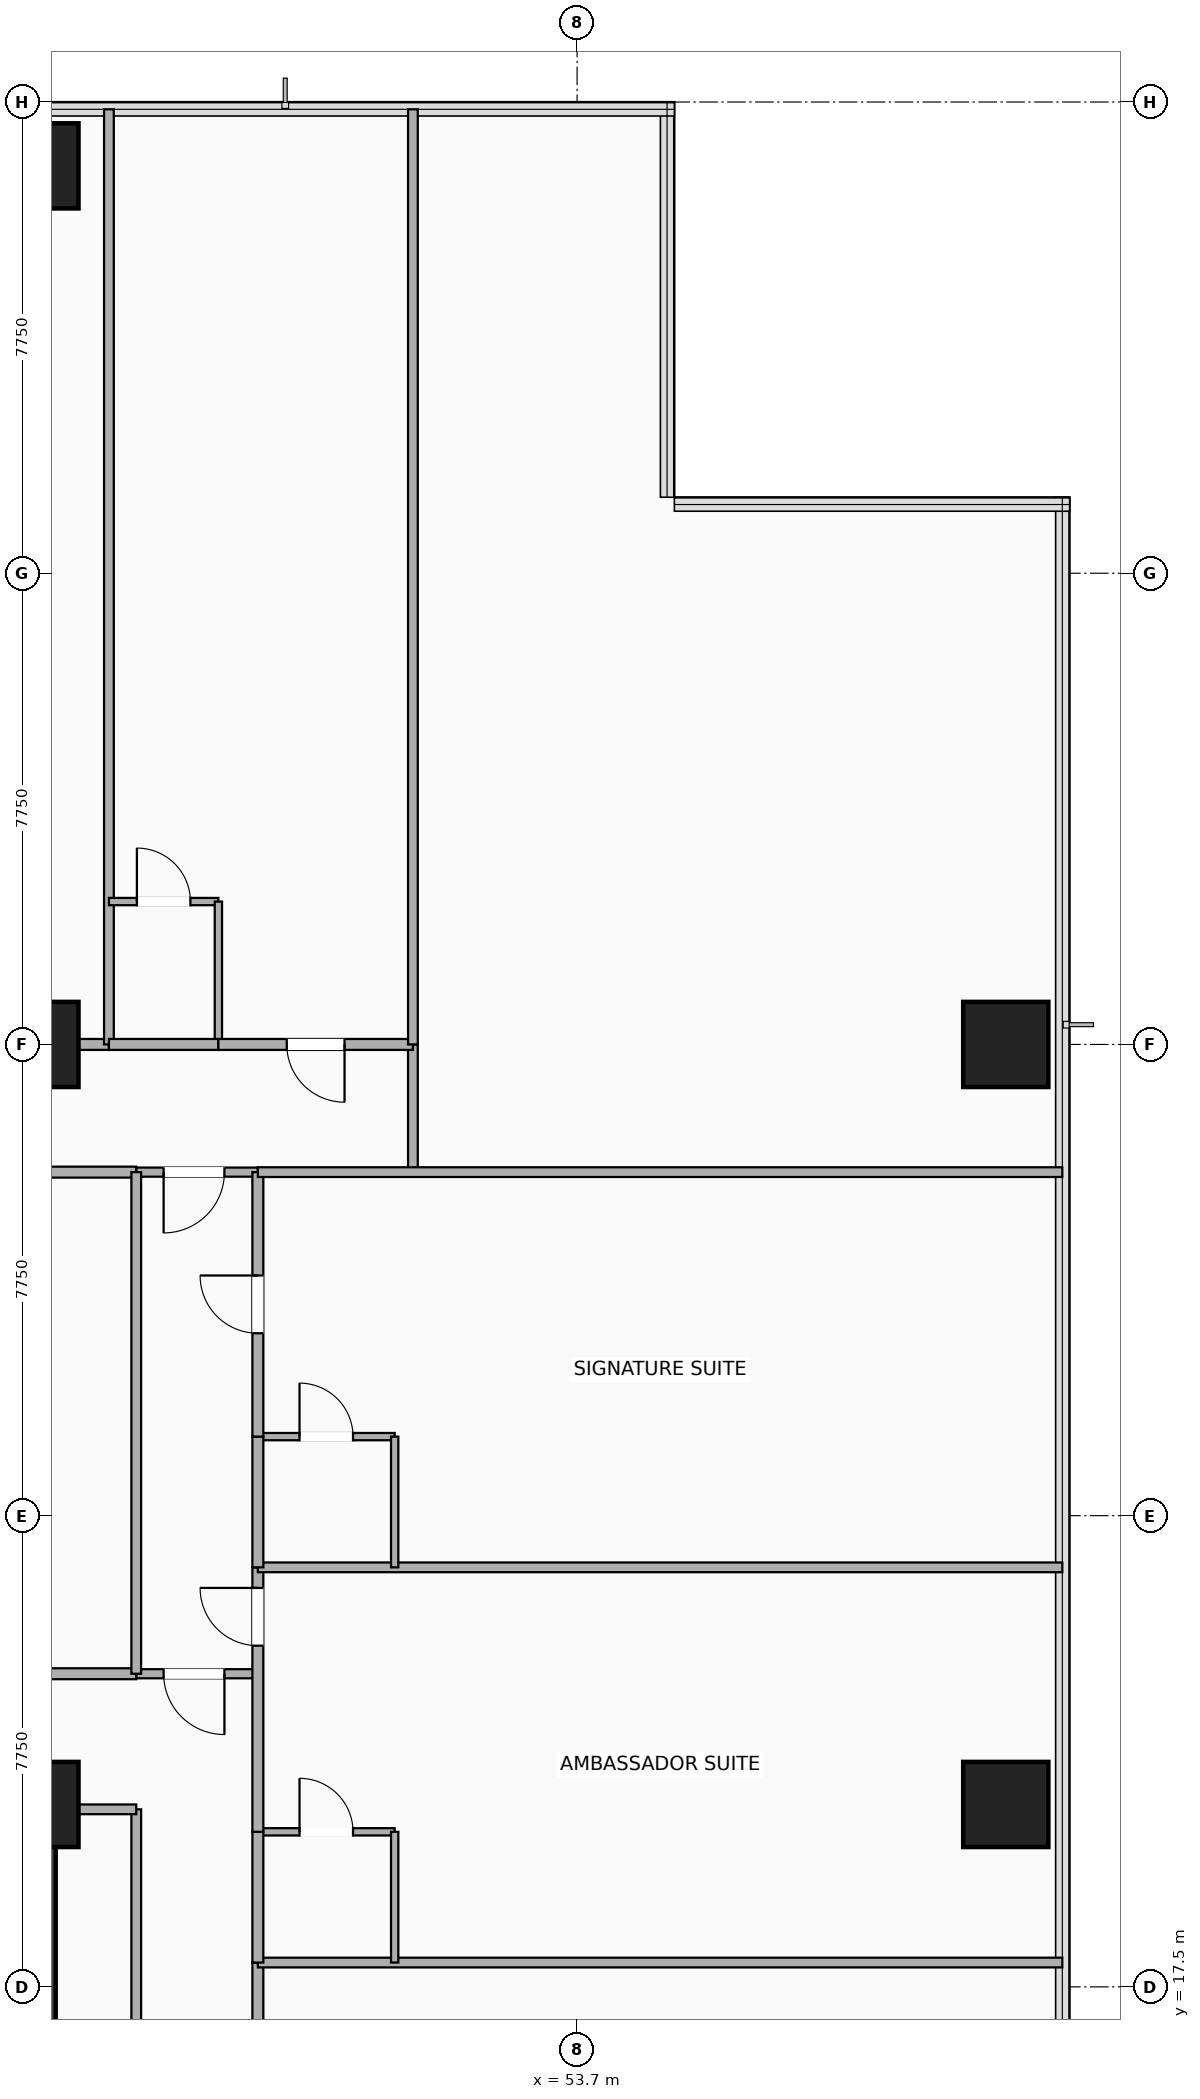
"""IFC4 building model, lengths in metres.
Left out: names, types, materials, properties, quantities, classifications, styles, units other than length and angle.
Written with IfcOpenShell. Run it as: python <this file> out.ifc"""

import sys

from ifc_helpers import new_model, si_unit, direction, frame, frame_2d, origin, origin_2d, place, context, subcontext, project, spatial, rectangle, extrude, element, fill, save


model = new_model("IFC4")
c1 = context("Model", 3, precision=1e-05, world=origin(), true_north=direction((0.0, 1.0)))
c2 = subcontext(c1, "Body", "Model", "MODEL_VIEW")
j1 = project(units=[si_unit("LENGTHUNIT", "METRE"), si_unit("PLANEANGLEUNIT", "RADIAN")], contexts=[c1])
p1 = place(None, origin())
s1 = spatial("IfcSite", under=j1, at=p1, CompositionType="ELEMENT")
p2 = place(p1, origin())
s2 = spatial("IfcBuilding", under=s1, at=p2, CompositionType="ELEMENT")
p3 = place(p2, frame((0.0, 0.0, 50.9)))
s3 = spatial("IfcBuildingStorey", under=s2, at=p3, CompositionType="ELEMENT", Elevation=50.9)
p4 = place(p3, frame((44.8, 3.5, 0.0), z_axis=(0.0, 0.0, 1.0), x_axis=(0.0, 1.0, 0.0)))
e1 = element("IfcWall", 1, at=p4, inside=s3, PredefinedType="SHEAR", context=c2, shape_type="SweptSolid", body=[
    extrude(rectangle(XDim=16.9, YDim=0.65, at=frame_2d((8.45, 0.0))), origin(), (0.0, 0.0, 1.0), 3.22),
])
for number, where, z_axis, x_axis in (
    (2, (44.8, 20.5, -0.28), (0.0, 0.0, 1.0), (1.0, 0.0, 0.0)),
    (3, (44.8, 33.0, -0.28), (0.0, 0.0, 1.0), (1.0, 0.0, 0.0)),
    (4, (60.75, 20.5, -0.28), (0.0, 0.0, 1.0), (1.0, 0.0, 0.0)),
    (5, (60.75, 33.0, -0.28), (0.0, 0.0, 1.0), (1.0, 0.0, 0.0)),
    (6, (44.8, 47.45, -0.28), (0.0, 0.0, 1.0), (1.0, 0.0, 0.0)),
):
    element("IfcColumn", number, at=place(p3, frame(where, z_axis=z_axis, x_axis=x_axis)), inside=s3, PredefinedType="COLUMN", context=c2, shape_type="SweptSolid", body=[
        extrude(rectangle(XDim=1.4, YDim=1.4, at=origin_2d()), origin(), (0.0, 0.0, 1.0), 3.5),
    ])
p5 = place(p3, frame((46.45, 11.4, 0.0), z_axis=(0.0, 0.0, 1.0), x_axis=(0.0, 1.0, 0.0)))
e7 = element("IfcWall", 7, at=p5, inside=s3, PredefinedType="PARTITIONING", context=c2, shape_type="SweptSolid", body=[
    extrude(rectangle(XDim=9.02, YDim=0.16, at=frame_2d((4.51, 0.0))), origin(), (0.0, 0.0, 1.0), 2.51),
])
p6 = place(p5, frame((0.4, 0.0, 0.0)))
e8 = element("IfcOpeningElement", 8, at=p6, cuts=e7, PredefinedType="OPENING", context=c2, shape_type="SweptSolid", body=[
    extrude(rectangle(XDim=0.88, YDim=2.08, at=frame_2d((0.44, 1.04))), frame((0.0, 0.09, 0.0), z_axis=(0.0, -1.0, 0.0), x_axis=(1.0, 0.0, 0.0)), (0.0, 0.0, 1.0), 0.18),
])
p7 = place(p3, frame((44.8, 20.42, 0.0), z_axis=(0.0, 0.0, 1.0), x_axis=(1.0, 0.0, 0.0)))
e9 = element("IfcWall", 9, at=p7, inside=s3, PredefinedType="PARTITIONING", context=c2, shape_type="SweptSolid", body=[
    extrude(rectangle(XDim=1.65, YDim=0.16, at=frame_2d((0.825, 0.0))), origin(), (0.0, 0.0, 1.0), 2.51),
])
p8 = place(p3, frame((46.45, 22.65, 0.0), z_axis=(0.0, 0.0, 1.0), x_axis=(1.0, 0.0, 0.0)))
e10 = element("IfcWall", 10, at=p8, inside=s3, PredefinedType="PARTITIONING", context=c2, shape_type="SweptSolid", body=[
    extrude(rectangle(XDim=2.0, YDim=0.15, at=frame_2d((1.0, 0.0))), origin(), (0.0, 0.0, 1.0), 3.22),
])
p9 = place(p8, frame((0.45, 0.0, 0.0)))
e11 = element("IfcOpeningElement", 11, at=p9, cuts=e10, PredefinedType="OPENING", context=c2, shape_type="SweptSolid", body=[
    extrude(rectangle(XDim=1.0, YDim=2.15, at=frame_2d((0.5, 1.075))), frame((0.0, 0.085, 0.0), z_axis=(0.0, -1.0, 0.0), x_axis=(1.0, 0.0, 0.0)), (0.0, 0.0, 1.0), 0.17),
])
p10 = place(p3, frame((46.45, 30.9, 0.0), z_axis=(0.0, 0.0, 1.0), x_axis=(1.0, 0.0, 0.0)))
e12 = element("IfcWall", 12, at=p10, inside=s3, PredefinedType="PARTITIONING", context=c2, shape_type="SweptSolid", body=[
    extrude(rectangle(XDim=2.0, YDim=0.15, at=frame_2d((1.0, 0.0))), origin(), (0.0, 0.0, 1.0), 3.22),
])
p11 = place(p10, frame((0.45, 0.0, 0.0)))
e13 = element("IfcOpeningElement", 13, at=p11, cuts=e12, PredefinedType="OPENING", context=c2, shape_type="SweptSolid", body=[
    extrude(rectangle(XDim=1.0, YDim=2.15, at=frame_2d((0.5, 1.075))), frame((0.0, 0.085, 0.0), z_axis=(0.0, -1.0, 0.0), x_axis=(1.0, 0.0, 0.0)), (0.0, 0.0, 1.0), 0.17),
])
p12 = place(p3, frame((51.0, 30.9, 0.0), z_axis=(0.0, 0.0, 1.0), x_axis=(0.0, 1.0, 0.0)))
e14 = element("IfcWall", 14, at=p12, inside=s3, PredefinedType="PARTITIONING", context=c2, shape_type="SweptSolid", body=[
    extrude(rectangle(XDim=2.1, YDim=0.16, at=frame_2d((1.05, 0.0))), origin(), (0.0, 0.0, 1.0), 2.51),
])
p13 = place(p3, frame((40.9, 22.65, 0.0), z_axis=(0.0, 0.0, 1.0), x_axis=(1.0, 0.0, 0.0)))
e15 = element("IfcWall", 15, at=p13, inside=s3, PredefinedType="PARTITIONING", context=c2, shape_type="SweptSolid", body=[
    extrude(rectangle(XDim=5.55, YDim=0.18, at=frame_2d((2.775, 0.0))), origin(), (0.0, 0.0, 1.0), 2.51),
])
p14 = place(p13, frame((2.3, 0.0, 0.0)))
e16 = element("IfcOpeningElement", 16, at=p14, cuts=e15, PredefinedType="OPENING", context=c2, shape_type="SweptSolid", body=[
    extrude(rectangle(XDim=0.95, YDim=2.15, at=frame_2d((0.475, 1.075))), frame((0.0, 0.1, 0.0), z_axis=(0.0, -1.0, 0.0), x_axis=(1.0, 0.0, 0.0)), (0.0, 0.0, 1.0), 0.2),
])
p15 = place(p3, frame((40.9, 30.9, 0.0), z_axis=(0.0, 0.0, 1.0), x_axis=(1.0, 0.0, 0.0)))
e17 = element("IfcWall", 17, at=p15, inside=s3, PredefinedType="PARTITIONING", context=c2, shape_type="SweptSolid", body=[
    extrude(rectangle(XDim=5.55, YDim=0.18, at=frame_2d((2.775, 0.0))), origin(), (0.0, 0.0, 1.0), 2.51),
])
p16 = place(p3, frame((46.45, 22.65, 0.0), z_axis=(0.0, 0.0, 1.0), x_axis=(0.0, 1.0, 0.0)))
e18 = element("IfcWall", 18, at=p16, inside=s3, PredefinedType="PARTITIONING", context=c2, shape_type="SweptSolid", body=[
    extrude(rectangle(XDim=8.25, YDim=0.16, at=frame_2d((4.125, 0.0))), origin(), (0.0, 0.0, 1.0), 2.788),
])
p17 = place(p3, frame((38.273, 33.0, 0.0), z_axis=(0.0, 0.0, 1.0), x_axis=(1.0, 0.0, 0.0)))
e19 = element("IfcWall", 19, at=p17, inside=s3, PredefinedType="PARTITIONING", context=c2, shape_type="SweptSolid", body=[
    extrude(rectangle(XDim=7.728, YDim=0.18, at=frame_2d((3.864, 0.0))), origin(), (0.0, 0.0, 1.0), 2.51),
])
p18 = place(p17, frame((3.389, 0.0, 0.0)))
e20 = element("IfcOpeningElement", 20, at=p18, cuts=e19, PredefinedType="OPENING", context=c2, shape_type="SweptSolid", body=[
    extrude(rectangle(XDim=0.95, YDim=2.15, at=frame_2d((0.475, 1.075))), frame((0.0, 0.1, 0.0), z_axis=(0.0, -1.0, 0.0), x_axis=(1.0, 0.0, 0.0)), (0.0, 0.0, 1.0), 0.2),
])
p19 = place(p3, frame((46.001, 33.0, 0.0), z_axis=(0.0, 0.0, 1.0), x_axis=(0.0, 1.0, 0.0)))
e21 = element("IfcWall", 21, at=p19, inside=s3, PredefinedType="PARTITIONING", context=c2, shape_type="SweptSolid", body=[
    extrude(rectangle(XDim=15.38, YDim=0.16, at=frame_2d((7.69, 0.0))), origin(), (0.0, 0.0, 1.0), 2.51),
])
p20 = place(p3, frame((46.001, 35.35, 0.0), z_axis=(0.0, 0.0, 1.0), x_axis=(1.0, 0.0, 0.0)))
e22 = element("IfcWall", 22, at=p20, inside=s3, PredefinedType="PARTITIONING", context=c2, shape_type="SweptSolid", body=[
    extrude(rectangle(XDim=1.8, YDim=0.12, at=frame_2d((0.9, 0.0))), origin(), (0.0, 0.0, 1.0), 3.22),
])
p21 = place(p20, frame((1.34, 0.0, 0.0), z_axis=(0.0, 0.0, 1.0), x_axis=(-1.0, 0.0, 0.0)))
e23 = element("IfcOpeningElement", 23, at=p21, cuts=e22, PredefinedType="OPENING", context=c2, shape_type="SweptSolid", body=[
    extrude(rectangle(XDim=0.88, YDim=2.08, at=frame_2d((0.44, 1.04))), frame((0.0, 0.07, 0.0), z_axis=(0.0, -1.0, 0.0), x_axis=(1.0, 0.0, 0.0)), (0.0, 0.0, 1.0), 0.14),
])
p22 = place(p3, frame((47.801, 33.0, 0.0), z_axis=(0.0, 0.0, 1.0), x_axis=(0.0, 1.0, 0.0)))
e24 = element("IfcWall", 24, at=p22, inside=s3, PredefinedType="PARTITIONING", context=c2, shape_type="SweptSolid", body=[
    extrude(rectangle(XDim=2.35, YDim=0.12, at=frame_2d((1.175, 0.0))), origin(), (0.0, 0.0, 1.0), 2.51),
])
p23 = place(p3, frame((46.001, 33.0, 0.0), z_axis=(0.0, 0.0, 1.0), x_axis=(1.0, 0.0, 0.0)))
e25 = element("IfcWall", 25, at=p23, inside=s3, PredefinedType="PARTITIONING", context=c2, shape_type="SweptSolid", body=[
    extrude(rectangle(XDim=1.8, YDim=0.18, at=frame_2d((0.9, 0.0))), origin(), (0.0, 0.0, 1.0), 2.51),
])
p24 = place(p3, frame((47.801, 33.0, 0.0), z_axis=(0.0, 0.0, 1.0), x_axis=(1.0, 0.0, 0.0)))
e26 = element("IfcWall", 26, at=p24, inside=s3, PredefinedType="PARTITIONING", context=c2, shape_type="SweptSolid", body=[
    extrude(rectangle(XDim=3.199, YDim=0.18, at=frame_2d((1.6, 0.0))), origin(), (0.0, 0.0, 1.0), 2.51),
])
p25 = place(p24, frame((1.125, 0.0, 0.0)))
e27 = element("IfcOpeningElement", 27, at=p25, cuts=e26, PredefinedType="OPENING", context=c2, shape_type="SweptSolid", body=[
    extrude(rectangle(XDim=0.95, YDim=2.15, at=frame_2d((0.475, 1.075))), frame((0.0, 0.1, 0.0), z_axis=(0.0, -1.0, 0.0), x_axis=(1.0, 0.0, 0.0)), (0.0, 0.0, 1.0), 0.2),
])
p26 = place(p3, frame((51.0, 33.0, 0.0), z_axis=(0.0, 0.0, 1.0), x_axis=(0.0, 1.0, 0.0)))
e28 = element("IfcWall", 28, at=p26, inside=s3, PredefinedType="PARTITIONING", context=c2, shape_type="SweptSolid", body=[
    extrude(rectangle(XDim=15.38, YDim=0.16, at=frame_2d((7.69, 0.0))), origin(), (0.0, 0.0, 1.0), 2.51),
])
p27 = place(p3, frame((48.45, 13.55, 0.0), z_axis=(0.0, 0.0, 1.0), x_axis=(0.0, 1.0, 0.0)))
e29 = element("IfcWall", 29, at=p27, inside=s3, PredefinedType="PARTITIONING", context=c2, shape_type="SweptSolid", body=[
    extrude(rectangle(XDim=4.35, YDim=0.18, at=frame_2d((2.175, 0.0))), origin(), (0.0, 0.0, 1.0), 2.902),
])
p28 = place(p27, frame((2.65, 0.0, 0.0), z_axis=(0.0, 0.0, 1.0), x_axis=(-1.0, 0.0, 0.0)))
e30 = element("IfcOpeningElement", 30, at=p28, cuts=e29, PredefinedType="OPENING", context=c2, shape_type="SweptSolid", body=[
    extrude(rectangle(XDim=0.95, YDim=2.15, at=frame_2d((0.475, 1.075))), frame((0.0, 0.1, 0.0), z_axis=(0.0, -1.0, 0.0), x_axis=(1.0, 0.0, 0.0)), (0.0, 0.0, 1.0), 0.2),
])
p29 = place(p3, frame((48.45, 17.9, 0.0), z_axis=(0.0, 0.0, 1.0), x_axis=(1.0, 0.0, 0.0)))
e31 = element("IfcWall", 31, at=p29, inside=s3, PredefinedType="PARTITIONING", context=c2, shape_type="SweptSolid", body=[
    extrude(rectangle(XDim=13.23, YDim=0.16, at=frame_2d((6.615, 0.0))), origin(), (0.0, 0.0, 1.0), 2.583),
])
p30 = place(p3, frame((48.45, 20.05, 0.0), z_axis=(0.0, 0.0, 1.0), x_axis=(1.0, 0.0, 0.0)))
e32 = element("IfcWall", 32, at=p30, inside=s3, PredefinedType="PARTITIONING", context=c2, shape_type="SweptSolid", body=[
    extrude(rectangle(XDim=2.25, YDim=0.12, at=frame_2d((1.125, 0.0))), origin(), (0.0, 0.0, 1.0), 3.22),
])
p31 = place(p30, frame((1.565, 0.0, 0.0), z_axis=(0.0, 0.0, 1.0), x_axis=(-1.0, 0.0, 0.0)))
e33 = element("IfcOpeningElement", 33, at=p31, cuts=e32, PredefinedType="OPENING", context=c2, shape_type="SweptSolid", body=[
    extrude(rectangle(XDim=0.88, YDim=2.08, at=frame_2d((0.44, 1.04))), frame((0.0, 0.07, 0.0), z_axis=(0.0, -1.0, 0.0), x_axis=(1.0, 0.0, 0.0)), (0.0, 0.0, 1.0), 0.14),
])
p32 = place(p3, frame((50.7, 17.9, 0.0), z_axis=(0.0, 0.0, 1.0), x_axis=(0.0, 1.0, 0.0)))
e34 = element("IfcWall", 34, at=p32, inside=s3, PredefinedType="PARTITIONING", context=c2, shape_type="SweptSolid", body=[
    extrude(rectangle(XDim=2.15, YDim=0.12, at=frame_2d((1.075, 0.0))), origin(), (0.0, 0.0, 1.0), 3.22),
])
p33 = place(p3, frame((48.45, 17.9, 0.0), z_axis=(0.0, 0.0, 1.0), x_axis=(0.0, 1.0, 0.0)))
e35 = element("IfcWall", 35, at=p33, inside=s3, PredefinedType="PARTITIONING", context=c2, shape_type="SweptSolid", body=[
    extrude(rectangle(XDim=2.15, YDim=0.18, at=frame_2d((1.075, 0.0))), origin(), (0.0, 0.0, 1.0), 3.22),
])
p34 = place(p3, frame((48.45, 20.05, 0.0), z_axis=(0.0, 0.0, 1.0), x_axis=(0.0, 1.0, 0.0)))
e36 = element("IfcWall", 36, at=p34, inside=s3, PredefinedType="PARTITIONING", context=c2, shape_type="SweptSolid", body=[
    extrude(rectangle(XDim=4.35, YDim=0.18, at=frame_2d((2.175, 0.0))), origin(), (0.0, 0.0, 1.0), 2.51),
])
p35 = place(p34, frame((4.011, 0.0, 0.0), z_axis=(0.0, 0.0, 1.0), x_axis=(-1.0, 0.0, 0.0)))
e37 = element("IfcOpeningElement", 37, at=p35, cuts=e36, PredefinedType="OPENING", context=c2, shape_type="SweptSolid", body=[
    extrude(rectangle(XDim=0.95, YDim=2.15, at=frame_2d((0.475, 1.075))), frame((0.0, 0.1, 0.0), z_axis=(0.0, -1.0, 0.0), x_axis=(1.0, 0.0, 0.0)), (0.0, 0.0, 1.0), 0.2),
])
p36 = place(p3, frame((48.45, 24.4, 0.0), z_axis=(0.0, 0.0, 1.0), x_axis=(1.0, 0.0, 0.0)))
e38 = element("IfcWall", 38, at=p36, inside=s3, PredefinedType="PARTITIONING", context=c2, shape_type="SweptSolid", body=[
    extrude(rectangle(XDim=13.23, YDim=0.16, at=frame_2d((6.615, 0.0))), origin(), (0.0, 0.0, 1.0), 2.583),
])
p37 = place(p3, frame((48.45, 26.55, 0.0), z_axis=(0.0, 0.0, 1.0), x_axis=(1.0, 0.0, 0.0)))
e39 = element("IfcWall", 39, at=p37, inside=s3, PredefinedType="PARTITIONING", context=c2, shape_type="SweptSolid", body=[
    extrude(rectangle(XDim=2.25, YDim=0.12, at=frame_2d((1.125, 0.0))), origin(), (0.0, 0.0, 1.0), 3.22),
])
p38 = place(p37, frame((1.565, 0.0, 0.0), z_axis=(0.0, 0.0, 1.0), x_axis=(-1.0, 0.0, 0.0)))
e40 = element("IfcOpeningElement", 40, at=p38, cuts=e39, PredefinedType="OPENING", context=c2, shape_type="SweptSolid", body=[
    extrude(rectangle(XDim=0.88, YDim=2.08, at=frame_2d((0.44, 1.04))), frame((0.0, 0.07, 0.0), z_axis=(0.0, -1.0, 0.0), x_axis=(1.0, 0.0, 0.0)), (0.0, 0.0, 1.0), 0.14),
])
p39 = place(p3, frame((50.7, 24.4, 0.0), z_axis=(0.0, 0.0, 1.0), x_axis=(0.0, 1.0, 0.0)))
e41 = element("IfcWall", 41, at=p39, inside=s3, PredefinedType="PARTITIONING", context=c2, shape_type="SweptSolid", body=[
    extrude(rectangle(XDim=2.15, YDim=0.12, at=frame_2d((1.075, 0.0))), origin(), (0.0, 0.0, 1.0), 2.788),
])
p40 = place(p3, frame((48.45, 24.4, 0.0), z_axis=(0.0, 0.0, 1.0), x_axis=(0.0, 1.0, 0.0)))
e42 = element("IfcWall", 42, at=p40, inside=s3, PredefinedType="PARTITIONING", context=c2, shape_type="SweptSolid", body=[
    extrude(rectangle(XDim=2.15, YDim=0.18, at=frame_2d((1.075, 0.0))), origin(), (0.0, 0.0, 1.0), 2.788),
])
p41 = place(p3, frame((48.45, 26.55, 0.0), z_axis=(0.0, 0.0, 1.0), x_axis=(0.0, 1.0, 0.0)))
e43 = element("IfcWall", 43, at=p41, inside=s3, PredefinedType="PARTITIONING", context=c2, shape_type="SweptSolid", body=[
    extrude(rectangle(XDim=4.35, YDim=0.18, at=frame_2d((2.175, 0.0))), origin(), (0.0, 0.0, 1.0), 2.788),
])
p42 = place(p41, frame((2.65, 0.0, 0.0), z_axis=(0.0, 0.0, 1.0), x_axis=(-1.0, 0.0, 0.0)))
e44 = element("IfcOpeningElement", 44, at=p42, cuts=e43, PredefinedType="OPENING", context=c2, shape_type="SweptSolid", body=[
    extrude(rectangle(XDim=0.95, YDim=2.15, at=frame_2d((0.475, 1.075))), frame((0.0, 0.1, 0.0), z_axis=(0.0, -1.0, 0.0), x_axis=(1.0, 0.0, 0.0)), (0.0, 0.0, 1.0), 0.2),
])
p43 = place(p3, frame((48.45, 30.9, 0.0), z_axis=(0.0, 0.0, 1.0), x_axis=(1.0, 0.0, 0.0)))
e45 = element("IfcWall", 45, at=p43, inside=s3, PredefinedType="PARTITIONING", context=c2, shape_type="SweptSolid", body=[
    extrude(rectangle(XDim=13.23, YDim=0.16, at=frame_2d((6.615, 0.0))), origin(), (0.0, 0.0, 1.0), 2.583),
])
p44 = place(p9, origin())
e46 = element("IfcDoor", 46, at=p44, inside=s3, OperationType="SINGLE_SWING_RIGHT", PredefinedType="DOOR", context=c2, shape_type="SweptSolid", body=[
    extrude(rectangle(XDim=1.0, YDim=2.15, at=frame_2d((0.5, 1.075))), frame((0.0, 0.025, 0.0), z_axis=(0.0, -1.0, 0.0), x_axis=(1.0, 0.0, 0.0)), (0.0, 0.0, 1.0), 0.05),
])
fill(e11, e46)
p45 = place(p11, origin())
e47 = element("IfcDoor", 47, at=p45, inside=s3, OperationType="SINGLE_SWING_LEFT", PredefinedType="DOOR", context=c2, shape_type="SweptSolid", body=[
    extrude(rectangle(XDim=1.0, YDim=2.15, at=frame_2d((0.5, 1.075))), frame((0.0, 0.025, 0.0), z_axis=(0.0, -1.0, 0.0), x_axis=(1.0, 0.0, 0.0)), (0.0, 0.0, 1.0), 0.05),
])
fill(e13, e47)
p46 = place(p21, origin())
e48 = element("IfcDoor", 48, at=p46, inside=s3, OperationType="SINGLE_SWING_LEFT", PredefinedType="DOOR", context=c2, shape_type="SweptSolid", body=[
    extrude(rectangle(XDim=0.88, YDim=2.08, at=frame_2d((0.44, 1.04))), frame((0.0, 0.025, 0.0), z_axis=(0.0, -1.0, 0.0), x_axis=(1.0, 0.0, 0.0)), (0.0, 0.0, 1.0), 0.05),
])
fill(e23, e48)
p47 = place(p25, origin())
e49 = element("IfcDoor", 49, at=p47, inside=s3, OperationType="SINGLE_SWING_RIGHT", PredefinedType="DOOR", context=c2, shape_type="SweptSolid", body=[
    extrude(rectangle(XDim=0.95, YDim=2.15, at=frame_2d((0.475, 1.075))), frame((0.0, 0.025, 0.0), z_axis=(0.0, -1.0, 0.0), x_axis=(1.0, 0.0, 0.0)), (0.0, 0.0, 1.0), 0.05),
])
fill(e27, e49)
p48 = place(p31, origin())
e50 = element("IfcDoor", 50, at=p48, inside=s3, OperationType="SINGLE_SWING_LEFT", PredefinedType="DOOR", context=c2, shape_type="SweptSolid", body=[
    extrude(rectangle(XDim=0.88, YDim=2.08, at=frame_2d((0.44, 1.04))), frame((0.0, 0.025, 0.0), z_axis=(0.0, -1.0, 0.0), x_axis=(1.0, 0.0, 0.0)), (0.0, 0.0, 1.0), 0.05),
])
fill(e33, e50)
p49 = place(p35, origin())
e51 = element("IfcDoor", 51, at=p49, inside=s3, OperationType="SINGLE_SWING_RIGHT", PredefinedType="DOOR", context=c2, shape_type="SweptSolid", body=[
    extrude(rectangle(XDim=0.95, YDim=2.15, at=frame_2d((0.475, 1.075))), frame((0.0, 0.025, 0.0), z_axis=(0.0, -1.0, 0.0), x_axis=(1.0, 0.0, 0.0)), (0.0, 0.0, 1.0), 0.05),
])
fill(e37, e51)
p50 = place(p38, origin())
e52 = element("IfcDoor", 52, at=p50, inside=s3, OperationType="SINGLE_SWING_LEFT", PredefinedType="DOOR", context=c2, shape_type="SweptSolid", body=[
    extrude(rectangle(XDim=0.88, YDim=2.08, at=frame_2d((0.44, 1.04))), frame((0.0, 0.025, 0.0), z_axis=(0.0, -1.0, 0.0), x_axis=(1.0, 0.0, 0.0)), (0.0, 0.0, 1.0), 0.05),
])
fill(e40, e52)
p51 = place(p42, origin())
e53 = element("IfcDoor", 53, at=p51, inside=s3, OperationType="SINGLE_SWING_RIGHT", PredefinedType="DOOR", context=c2, shape_type="SweptSolid", body=[
    extrude(rectangle(XDim=0.95, YDim=2.15, at=frame_2d((0.475, 1.075))), frame((0.0, 0.025, 0.0), z_axis=(0.0, -1.0, 0.0), x_axis=(1.0, 0.0, 0.0)), (0.0, 0.0, 1.0), 0.05),
])
fill(e44, e53)
save(model, sys.argv[1])
